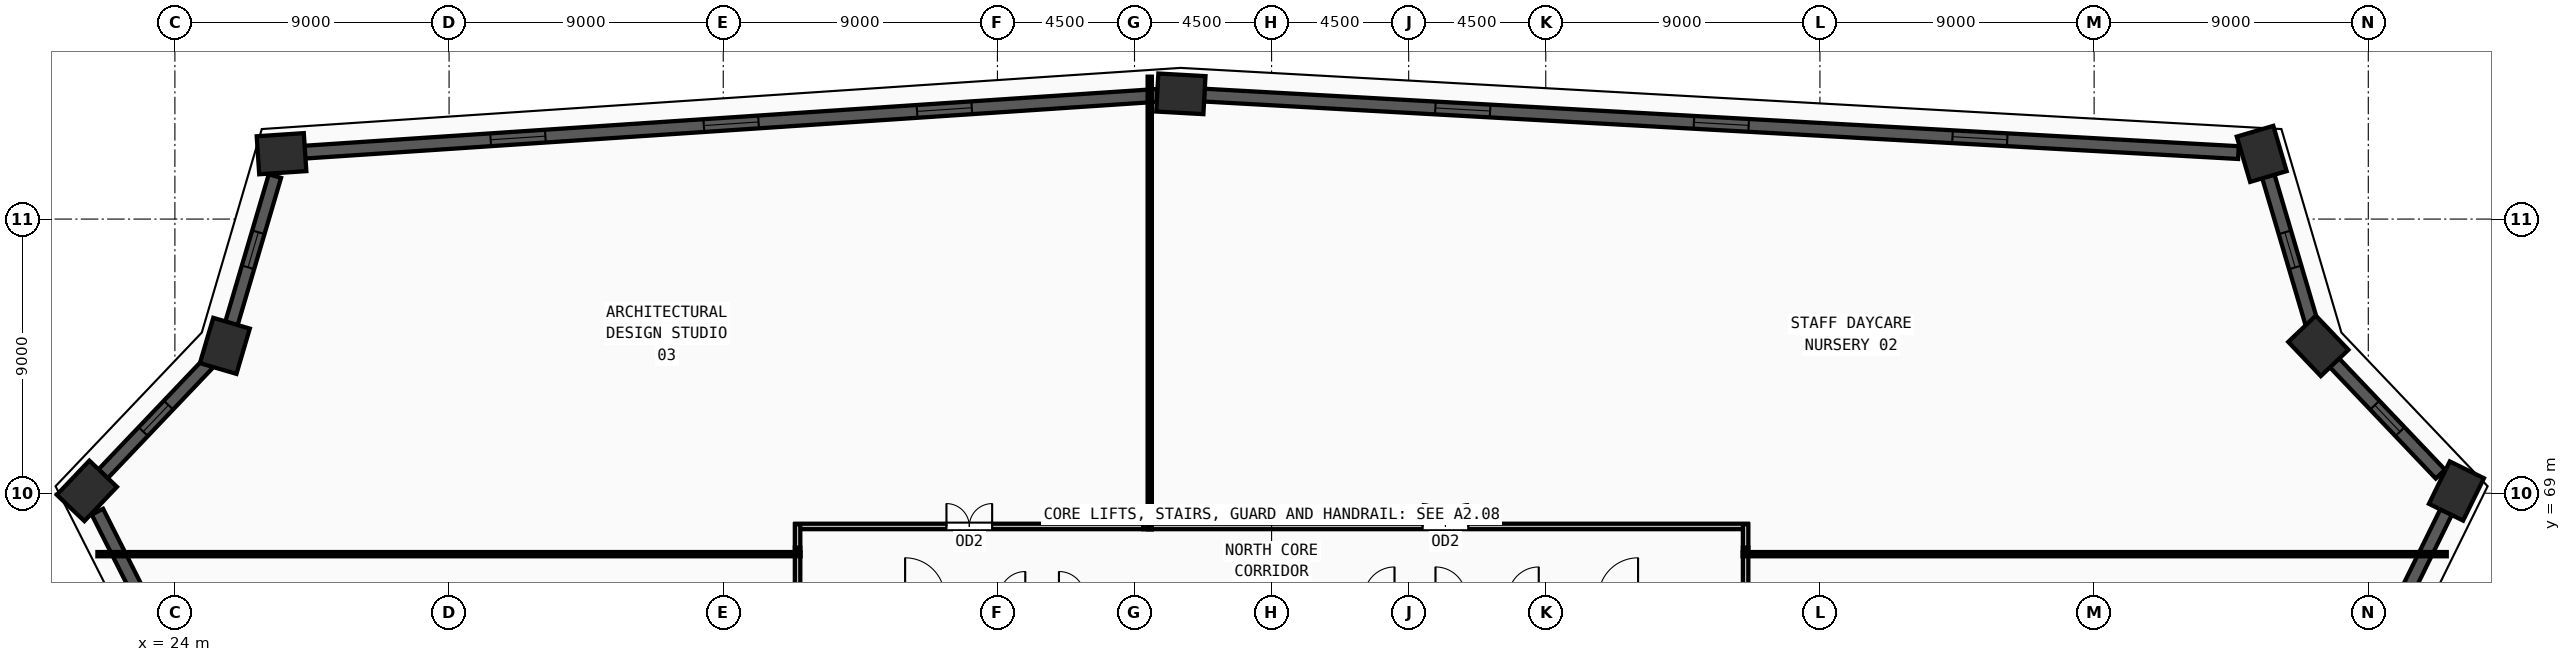
"""IFC4 building model, lengths in metres.
Left out: names, types, materials, properties, quantities, classifications, styles, units other than length and angle.
Written with IfcOpenShell. Run it as: python <this file> out.ifc"""

import sys

from ifc_helpers import new_model, si_unit, direction, frame, frame_2d, origin, origin_2d, place, context, subcontext, project, spatial, rectangle, extrude, source, transform, mapped, element, fill, save


model = new_model("IFC4")
c1 = context("Model", 3, precision=1e-05, world=origin(), true_north=direction((0.0, 1.0)))
c2 = subcontext(c1, "Body", "Model", "MODEL_VIEW")
j1 = project(units=[si_unit("LENGTHUNIT", "METRE"), si_unit("PLANEANGLEUNIT", "RADIAN")], contexts=[c1])
p1 = place(None, origin())
s1 = spatial("IfcSite", under=j1, at=p1, CompositionType="ELEMENT")
p2 = place(p1, origin())
s2 = spatial("IfcBuilding", under=s1, at=p2, CompositionType="ELEMENT")
p3 = place(p2, frame((0.0, 0.0, 39.75)))
s3 = spatial("IfcBuildingStorey", under=s2, at=p3, CompositionType="ELEMENT", Elevation=39.75)
m1 = source(origin(), c2, "Body", "SweptSolid", [
    extrude(rectangle(XDim=1.55, YDim=1.25, at=origin_2d()), origin(), (0.0, 0.0, 1.0), 3.75),
])
for number, where, z_axis, x_axis in (
    (1, (21.111, 69.078, 0.0), (0.0, 0.0, 1.0), (0.689, 0.724, 0.0)),
    (2, (25.64, 73.838, 0.0), (0.0, 0.0, 1.0), (0.283, 0.959, 0.0)),
    (3, (27.5, 80.146, 0.0), (0.0, 0.0, 1.0), (0.998, 0.066, 0.0)),
    (4, (57.022, 82.111, 0.0), (0.0, 0.0, 1.0), (-0.998, 0.055, 0.0)),
    (5, (92.502, 80.14, 0.0), (0.0, 0.0, 1.0), (-0.283, 0.959, 0.0)),
    (6, (94.36, 73.838, 0.0), (0.0, 0.0, 1.0), (-0.689, 0.724, 0.0)),
    (7, (98.894, 69.073, 0.0), (0.0, 0.0, 1.0), (0.441, 0.897, 0.0)),
):
    element("IfcColumn", number, at=place(p3, frame(where, z_axis=z_axis, x_axis=x_axis)), inside=s3, PredefinedType="COLUMN", context=c2, shape_type="MappedRepresentation", body=[
        mapped(m1, transform((0.0, 0.0, 0.0), x_axis=(1.0, 0.0, 0.0), y_axis=(0.0, 1.0, 0.0), z_axis=(0.0, 0.0, 1.0), scale=1.0)),
    ])
p4 = place(p3, frame((86.172, 43.21, 0.0), z_axis=(0.0, 0.0, 1.0), x_axis=(0.441367208162, 0.897326577985, 0.0)))
e8 = element("IfcWall", 8, at=p4, inside=s3, PredefinedType="SOLIDWALL", context=c2, shape_type="SweptSolid", body=[
    extrude(rectangle(XDim=28.058, YDim=0.42, at=frame_2d((14.029, 0.0))), origin(), (0.0, 0.0, 1.0), 3.57),
])
m2 = source(origin(), c2, "Body", "SweptSolid", [
    extrude(rectangle(XDim=1.8, YDim=1.95, at=frame_2d((0.9, 0.975))), frame((0.0, 0.22, 0.0), z_axis=(0.0, -1.0, 0.0), x_axis=(1.0, 0.0, 0.0)), (0.0, 0.0, 1.0), 0.44),
])
p5 = place(p4, frame((8.314, 0.0, 0.55)))
e9 = element("IfcOpeningElement", 9, at=p5, cuts=e8, PredefinedType="OPENING", context=c2, shape_type="MappedRepresentation", body=[
    mapped(m2, transform((0.0, 0.0, 0.0), x_axis=(1.0, 0.0, 0.0), y_axis=(0.0, 1.0, 0.0), z_axis=(0.0, 0.0, 1.0), scale=1.0)),
])
p6 = place(p4, frame((13.129, 0.0, 0.55)))
e10 = element("IfcOpeningElement", 10, at=p6, cuts=e8, PredefinedType="OPENING", context=c2, shape_type="MappedRepresentation", body=[
    mapped(m2, transform((0.0, 0.0, 0.0), x_axis=(1.0, 0.0, 0.0), y_axis=(0.0, 1.0, 0.0), z_axis=(0.0, 0.0, 1.0), scale=1.0)),
])
p7 = place(p4, frame((20.143, 0.0, 0.55)))
e11 = element("IfcOpeningElement", 11, at=p7, cuts=e8, PredefinedType="OPENING", context=c2, shape_type="MappedRepresentation", body=[
    mapped(m2, transform((0.0, 0.0, 0.0), x_axis=(1.0, 0.0, 0.0), y_axis=(0.0, 1.0, 0.0), z_axis=(0.0, 0.0, 1.0), scale=1.0)),
])
p8 = place(p3, frame((98.367, 69.627, 0.0), z_axis=(0.0, 0.0, 1.0), x_axis=(-0.689358039111, 0.724420798923, 0.0)))
e12 = element("IfcWall", 12, at=p8, inside=s3, PredefinedType="SOLIDWALL", context=c2, shape_type="SweptSolid", body=[
    extrude(rectangle(XDim=5.048, YDim=0.42, at=frame_2d((2.524, 0.0))), origin(), (0.0, 0.0, 1.0), 3.57),
])
m3 = source(origin(), c2, "Body", "SweptSolid", [
    extrude(rectangle(XDim=1.2, YDim=1.9, at=frame_2d((0.6, 0.95))), frame((0.0, 0.22, 0.0), z_axis=(0.0, -1.0, 0.0), x_axis=(1.0, 0.0, 0.0)), (0.0, 0.0, 1.0), 0.44),
])
p9 = place(p8, frame((1.924, 0.0, 0.55)))
e13 = element("IfcOpeningElement", 13, at=p9, cuts=e12, PredefinedType="OPENING", context=c2, shape_type="MappedRepresentation", body=[
    mapped(m3, transform((0.0, 0.0, 0.0), x_axis=(1.0, 0.0, 0.0), y_axis=(0.0, 1.0, 0.0), z_axis=(0.0, 0.0, 1.0), scale=1.0)),
])
p10 = place(p3, frame((94.144, 74.572, 0.0), z_axis=(0.0, 0.0, 1.0), x_axis=(-0.282945147244, 0.959136092351, 0.0)))
e14 = element("IfcWall", 14, at=p10, inside=s3, PredefinedType="SOLIDWALL", context=c2, shape_type="SweptSolid", body=[
    extrude(rectangle(XDim=5.04, YDim=0.42, at=frame_2d((2.52, 0.0))), origin(), (0.0, 0.0, 1.0), 3.57),
])
p11 = place(p10, frame((1.92, 0.0, 0.55)))
e15 = element("IfcOpeningElement", 15, at=p11, cuts=e14, PredefinedType="OPENING", context=c2, shape_type="MappedRepresentation", body=[
    mapped(m3, transform((0.0, 0.0, 0.0), x_axis=(1.0, 0.0, 0.0), y_axis=(0.0, 1.0, 0.0), z_axis=(0.0, 0.0, 1.0), scale=1.0)),
])
p12 = place(p3, frame((91.738, 80.182, 0.0), z_axis=(0.0, 0.0, 1.0), x_axis=(-0.998458762228, 0.055498649812, 0.0)))
e16 = element("IfcWall", 16, at=p12, inside=s3, PredefinedType="SOLIDWALL", context=c2, shape_type="SweptSolid", body=[
    extrude(rectangle(XDim=34.005, YDim=0.42, at=frame_2d((17.002, 0.0))), origin(), (0.0, 0.0, 1.0), 3.57),
])
p13 = place(p12, frame((7.601, 0.0, 0.55)))
e17 = element("IfcOpeningElement", 17, at=p13, cuts=e16, PredefinedType="OPENING", context=c2, shape_type="MappedRepresentation", body=[
    mapped(m2, transform((0.0, 0.0, 0.0), x_axis=(1.0, 0.0, 0.0), y_axis=(0.0, 1.0, 0.0), z_axis=(0.0, 0.0, 1.0), scale=1.0)),
])
p14 = place(p12, frame((16.102, 0.0, 0.55)))
e18 = element("IfcOpeningElement", 18, at=p14, cuts=e16, PredefinedType="OPENING", context=c2, shape_type="MappedRepresentation", body=[
    mapped(m2, transform((0.0, 0.0, 0.0), x_axis=(1.0, 0.0, 0.0), y_axis=(0.0, 1.0, 0.0), z_axis=(0.0, 0.0, 1.0), scale=1.0)),
])
p15 = place(p12, frame((24.603, 0.0, 0.55)))
e19 = element("IfcOpeningElement", 19, at=p15, cuts=e16, PredefinedType="OPENING", context=c2, shape_type="MappedRepresentation", body=[
    mapped(m2, transform((0.0, 0.0, 0.0), x_axis=(1.0, 0.0, 0.0), y_axis=(0.0, 1.0, 0.0), z_axis=(0.0, 0.0, 1.0), scale=1.0)),
])
p16 = place(p3, frame((56.259, 82.06, 0.0), z_axis=(0.0, 0.0, 1.0), x_axis=(-0.997793120451, -0.066399463707, 0.0)))
e20 = element("IfcWall", 20, at=p16, inside=s3, PredefinedType="SOLIDWALL", context=c2, shape_type="SweptSolid", body=[
    extrude(rectangle(XDim=28.058, YDim=0.42, at=frame_2d((14.029, 0.0))), origin(), (0.0, 0.0, 1.0), 3.57),
])
p17 = place(p16, frame((6.114, 0.0, 0.55)))
e21 = element("IfcOpeningElement", 21, at=p17, cuts=e20, PredefinedType="OPENING", context=c2, shape_type="MappedRepresentation", body=[
    mapped(m2, transform((0.0, 0.0, 0.0), x_axis=(1.0, 0.0, 0.0), y_axis=(0.0, 1.0, 0.0), z_axis=(0.0, 0.0, 1.0), scale=1.0)),
])
p18 = place(p16, frame((13.129, 0.0, 0.55)))
e22 = element("IfcOpeningElement", 22, at=p18, cuts=e20, PredefinedType="OPENING", context=c2, shape_type="MappedRepresentation", body=[
    mapped(m2, transform((0.0, 0.0, 0.0), x_axis=(1.0, 0.0, 0.0), y_axis=(0.0, 1.0, 0.0), z_axis=(0.0, 0.0, 1.0), scale=1.0)),
])
p19 = place(p16, frame((20.143, 0.0, 0.55)))
e23 = element("IfcOpeningElement", 23, at=p19, cuts=e20, PredefinedType="OPENING", context=c2, shape_type="MappedRepresentation", body=[
    mapped(m2, transform((0.0, 0.0, 0.0), x_axis=(1.0, 0.0, 0.0), y_axis=(0.0, 1.0, 0.0), z_axis=(0.0, 0.0, 1.0), scale=1.0)),
])
p20 = place(p3, frame((27.284, 79.412, 0.0), z_axis=(0.0, 0.0, 1.0), x_axis=(-0.282972963709, -0.959127886056, 0.0)))
e24 = element("IfcWall", 24, at=p20, inside=s3, PredefinedType="SOLIDWALL", context=c2, shape_type="SweptSolid", body=[
    extrude(rectangle(XDim=5.046, YDim=0.42, at=frame_2d((2.523, 0.0))), origin(), (0.0, 0.0, 1.0), 3.57),
])
p21 = place(p20, frame((1.923, 0.0, 0.55)))
e25 = element("IfcOpeningElement", 25, at=p21, cuts=e24, PredefinedType="OPENING", context=c2, shape_type="MappedRepresentation", body=[
    mapped(m3, transform((0.0, 0.0, 0.0), x_axis=(1.0, 0.0, 0.0), y_axis=(0.0, 1.0, 0.0), z_axis=(0.0, 0.0, 1.0), scale=1.0)),
])
p22 = place(p3, frame((25.113, 73.284, 0.0), z_axis=(0.0, 0.0, 1.0), x_axis=(-0.689357621712, -0.72442119612, 0.0)))
e26 = element("IfcWall", 26, at=p22, inside=s3, PredefinedType="SOLIDWALL", context=c2, shape_type="SweptSolid", body=[
    extrude(rectangle(XDim=5.041, YDim=0.42, at=frame_2d((2.521, 0.0))), origin(), (0.0, 0.0, 1.0), 3.57),
])
p23 = place(p22, frame((1.921, 0.0, 0.55)))
e27 = element("IfcOpeningElement", 27, at=p23, cuts=e26, PredefinedType="OPENING", context=c2, shape_type="MappedRepresentation", body=[
    mapped(m3, transform((0.0, 0.0, 0.0), x_axis=(1.0, 0.0, 0.0), y_axis=(0.0, 1.0, 0.0), z_axis=(0.0, 0.0, 1.0), scale=1.0)),
])
p24 = place(p3, frame((21.456, 68.395, 0.0), z_axis=(0.0, 0.0, 1.0), x_axis=(0.451198099626, -0.892423820219, 0.0)))
e28 = element("IfcWall", 28, at=p24, inside=s3, PredefinedType="SOLIDWALL", context=c2, shape_type="SweptSolid", body=[
    extrude(rectangle(XDim=34.005, YDim=0.42, at=frame_2d((17.002, 0.0))), origin(), (0.0, 0.0, 1.0), 3.57),
])
p25 = place(p24, frame((7.601, 0.0, 0.55)))
e29 = element("IfcOpeningElement", 29, at=p25, cuts=e28, PredefinedType="OPENING", context=c2, shape_type="MappedRepresentation", body=[
    mapped(m2, transform((0.0, 0.0, 0.0), x_axis=(1.0, 0.0, 0.0), y_axis=(0.0, 1.0, 0.0), z_axis=(0.0, 0.0, 1.0), scale=1.0)),
])
p26 = place(p24, frame((16.103, 0.0, 0.55)))
e30 = element("IfcOpeningElement", 30, at=p26, cuts=e28, PredefinedType="OPENING", context=c2, shape_type="MappedRepresentation", body=[
    mapped(m2, transform((0.0, 0.0, 0.0), x_axis=(1.0, 0.0, 0.0), y_axis=(0.0, 1.0, 0.0), z_axis=(0.0, 0.0, 1.0), scale=1.0)),
])
p27 = place(p3, frame((55.785, 67.91, 0.0), z_axis=(0.0, 0.0, 1.0), x_axis=(1.0, 0.0, 0.0)))
e31 = element("IfcWall", 31, at=p27, inside=s3, PredefinedType="PARTITIONING", context=c2, shape_type="SweptSolid", body=[
    extrude(rectangle(XDim=19.845, YDim=0.18, at=frame_2d((9.922, 0.0))), origin(), (0.0, 0.0, 1.0), 3.57),
])
m4 = source(origin(), c2, "Body", "SweptSolid", [
    extrude(rectangle(XDim=1.5, YDim=2.2, at=frame_2d((0.75, 1.1))), frame((0.0, 0.1, 0.0), z_axis=(0.0, -1.0, 0.0), x_axis=(1.0, 0.0, 0.0)), (0.0, 0.0, 1.0), 0.2),
])
p28 = place(p27, frame((9.172, 0.0, 0.0)))
e32 = element("IfcOpeningElement", 32, at=p28, cuts=e31, PredefinedType="OPENING", context=c2, shape_type="MappedRepresentation", body=[
    mapped(m4, transform((0.0, 0.0, 0.0), x_axis=(1.0, 0.0, 0.0), y_axis=(0.0, 1.0, 0.0), z_axis=(0.0, 0.0, 1.0), scale=1.0)),
])
p29 = place(p3, frame((44.37, 67.91, 0.0), z_axis=(0.0, 0.0, 1.0), x_axis=(1.0, 0.0, 0.0)))
e33 = element("IfcWall", 33, at=p29, inside=s3, PredefinedType="PARTITIONING", context=c2, shape_type="SweptSolid", body=[
    extrude(rectangle(XDim=11.415, YDim=0.18, at=frame_2d((5.708, 0.0))), origin(), (0.0, 0.0, 1.0), 3.57),
])
p30 = place(p29, frame((4.957, 0.0, 0.0)))
e34 = element("IfcOpeningElement", 34, at=p30, cuts=e33, PredefinedType="OPENING", context=c2, shape_type="MappedRepresentation", body=[
    mapped(m4, transform((0.0, 0.0, 0.0), x_axis=(1.0, 0.0, 0.0), y_axis=(0.0, 1.0, 0.0), z_axis=(0.0, 0.0, 1.0), scale=1.0)),
])
p31 = place(p3, frame((44.44, 54.785, 0.0), z_axis=(0.0, 0.0, 1.0), x_axis=(0.0, 1.0, 0.0)))
e35 = element("IfcWall", 35, at=p31, inside=s3, PredefinedType="PARTITIONING", context=c2, shape_type="SweptSolid", body=[
    extrude(rectangle(XDim=12.43, YDim=0.18, at=frame_2d((6.215, 0.0))), origin(), (0.0, 0.0, 1.0), 3.57),
])
p32 = place(p31, frame((5.465, 0.0, 0.0)))
e36 = element("IfcOpeningElement", 36, at=p32, cuts=e35, PredefinedType="OPENING", context=c2, shape_type="MappedRepresentation", body=[
    mapped(m4, transform((0.0, 0.0, 0.0), x_axis=(1.0, 0.0, 0.0), y_axis=(0.0, 1.0, 0.0), z_axis=(0.0, 0.0, 1.0), scale=1.0)),
])
p33 = place(p3, frame((75.56, 67.215, 0.0), z_axis=(0.0, 0.0, 1.0), x_axis=(0.0, -1.0, 0.0)))
e37 = element("IfcWall", 37, at=p33, inside=s3, PredefinedType="PARTITIONING", context=c2, shape_type="SweptSolid", body=[
    extrude(rectangle(XDim=2.235, YDim=0.18, at=frame_2d((1.118, 0.0))), origin(), (0.0, 0.0, 1.0), 3.57),
])
for number, where, z_axis, x_axis in (
    (38, (75.56, 67.98, 0.0), (0.0, 0.0, 1.0), (0.0, -1.0, 0.0)),
    (39, (44.44, 67.215, 0.0), (0.0, 0.0, 1.0), (0.0, 1.0, 0.0)),
):
    element("IfcWall", number, at=place(p3, frame(where, z_axis=z_axis, x_axis=x_axis)), inside=s3, PredefinedType="PARTITIONING", context=c2, shape_type="SweptSolid", body=[
        extrude(rectangle(XDim=0.765, YDim=0.18, at=frame_2d((0.382, 0.0))), origin(), (0.0, 0.0, 1.0), 3.57),
    ])
p34 = place(p3, frame((44.54, 67.0, 0.0), z_axis=(0.0, 0.0, 1.0), x_axis=(-1.0, 0.0, 0.0)))
e40 = element("IfcWall", 40, at=p34, inside=s3, PredefinedType="PARTITIONING", context=c2, shape_type="SweptSolid", body=[
    extrude(rectangle(XDim=23.084, YDim=0.14, at=frame_2d((11.542, 0.0))), origin(), (0.0, 0.0, 1.0), 2.655),
])
p35 = place(p3, frame((75.46, 67.0, 0.0), z_axis=(0.0, 0.0, 1.0), x_axis=(1.0, 0.0, 0.0)))
e41 = element("IfcWall", 41, at=p35, inside=s3, PredefinedType="PARTITIONING", context=c2, shape_type="SweptSolid", body=[
    extrude(rectangle(XDim=23.116, YDim=0.14, at=frame_2d((11.558, 0.0))), origin(), (0.0, 0.0, 1.0), 2.655),
])
p36 = place(p3, frame((56.0, 67.81, 0.0), z_axis=(0.0, 0.0, 1.0), x_axis=(0.0, 1.0, 0.0)))
e42 = element("IfcWall", 42, at=p36, inside=s3, PredefinedType="PARTITIONING", context=c2, shape_type="SweptSolid", body=[
    extrude(rectangle(XDim=14.865, YDim=0.14, at=frame_2d((7.433, 0.0))), origin(), (0.0, 0.0, 1.0), 3.57),
])
m5 = source(origin(), c2, "Body", "SweptSolid", [
    extrude(rectangle(XDim=1.2, YDim=1.9, at=frame_2d((0.6, 0.95))), frame((0.0, 0.03, 0.0), z_axis=(0.0, -1.0, 0.0), x_axis=(1.0, 0.0, 0.0)), (0.0, 0.0, 1.0), 0.06),
])
p37 = place(p9, origin())
e43 = element("IfcWindow", 43, at=p37, inside=s3, PartitioningType="SINGLE_PANEL", PredefinedType="WINDOW", context=c2, shape_type="MappedRepresentation", body=[
    mapped(m5, transform((0.0, 0.0, 0.0), x_axis=(1.0, 0.0, 0.0), y_axis=(0.0, 1.0, 0.0), z_axis=(0.0, 0.0, 1.0), scale=1.0)),
])
fill(e13, e43)
p38 = place(p11, origin())
e44 = element("IfcWindow", 44, at=p38, inside=s3, PartitioningType="SINGLE_PANEL", PredefinedType="WINDOW", context=c2, shape_type="MappedRepresentation", body=[
    mapped(m5, transform((0.0, 0.0, 0.0), x_axis=(1.0, 0.0, 0.0), y_axis=(0.0, 1.0, 0.0), z_axis=(0.0, 0.0, 1.0), scale=1.0)),
])
fill(e15, e44)
m6 = source(origin(), c2, "Body", "SweptSolid", [
    extrude(rectangle(XDim=1.8, YDim=1.95, at=frame_2d((0.9, 0.975))), frame((0.0, 0.03, 0.0), z_axis=(0.0, -1.0, 0.0), x_axis=(1.0, 0.0, 0.0)), (0.0, 0.0, 1.0), 0.06),
])
p39 = place(p13, origin())
e45 = element("IfcWindow", 45, at=p39, inside=s3, PartitioningType="DOUBLE_PANEL_VERTICAL", PredefinedType="WINDOW", context=c2, shape_type="MappedRepresentation", body=[
    mapped(m6, transform((0.0, 0.0, 0.0), x_axis=(1.0, 0.0, 0.0), y_axis=(0.0, 1.0, 0.0), z_axis=(0.0, 0.0, 1.0), scale=1.0)),
])
fill(e17, e45)
p40 = place(p14, origin())
e46 = element("IfcWindow", 46, at=p40, inside=s3, PartitioningType="DOUBLE_PANEL_VERTICAL", PredefinedType="WINDOW", context=c2, shape_type="MappedRepresentation", body=[
    mapped(m6, transform((0.0, 0.0, 0.0), x_axis=(1.0, 0.0, 0.0), y_axis=(0.0, 1.0, 0.0), z_axis=(0.0, 0.0, 1.0), scale=1.0)),
])
fill(e18, e46)
p41 = place(p15, origin())
e47 = element("IfcWindow", 47, at=p41, inside=s3, PartitioningType="DOUBLE_PANEL_VERTICAL", PredefinedType="WINDOW", context=c2, shape_type="MappedRepresentation", body=[
    mapped(m6, transform((0.0, 0.0, 0.0), x_axis=(1.0, 0.0, 0.0), y_axis=(0.0, 1.0, 0.0), z_axis=(0.0, 0.0, 1.0), scale=1.0)),
])
fill(e19, e47)
p42 = place(p17, origin())
e48 = element("IfcWindow", 48, at=p42, inside=s3, PartitioningType="DOUBLE_PANEL_VERTICAL", PredefinedType="WINDOW", context=c2, shape_type="MappedRepresentation", body=[
    mapped(m6, transform((0.0, 0.0, 0.0), x_axis=(1.0, 0.0, 0.0), y_axis=(0.0, 1.0, 0.0), z_axis=(0.0, 0.0, 1.0), scale=1.0)),
])
fill(e21, e48)
p43 = place(p18, origin())
e49 = element("IfcWindow", 49, at=p43, inside=s3, PartitioningType="DOUBLE_PANEL_VERTICAL", PredefinedType="WINDOW", context=c2, shape_type="MappedRepresentation", body=[
    mapped(m6, transform((0.0, 0.0, 0.0), x_axis=(1.0, 0.0, 0.0), y_axis=(0.0, 1.0, 0.0), z_axis=(0.0, 0.0, 1.0), scale=1.0)),
])
fill(e22, e49)
p44 = place(p19, origin())
e50 = element("IfcWindow", 50, at=p44, inside=s3, PartitioningType="DOUBLE_PANEL_VERTICAL", PredefinedType="WINDOW", context=c2, shape_type="MappedRepresentation", body=[
    mapped(m6, transform((0.0, 0.0, 0.0), x_axis=(1.0, 0.0, 0.0), y_axis=(0.0, 1.0, 0.0), z_axis=(0.0, 0.0, 1.0), scale=1.0)),
])
fill(e23, e50)
p45 = place(p21, origin())
e51 = element("IfcWindow", 51, at=p45, inside=s3, PartitioningType="SINGLE_PANEL", PredefinedType="WINDOW", context=c2, shape_type="MappedRepresentation", body=[
    mapped(m5, transform((0.0, 0.0, 0.0), x_axis=(1.0, 0.0, 0.0), y_axis=(0.0, 1.0, 0.0), z_axis=(0.0, 0.0, 1.0), scale=1.0)),
])
fill(e25, e51)
p46 = place(p23, origin())
e52 = element("IfcWindow", 52, at=p46, inside=s3, PartitioningType="SINGLE_PANEL", PredefinedType="WINDOW", context=c2, shape_type="MappedRepresentation", body=[
    mapped(m5, transform((0.0, 0.0, 0.0), x_axis=(1.0, 0.0, 0.0), y_axis=(0.0, 1.0, 0.0), z_axis=(0.0, 0.0, 1.0), scale=1.0)),
])
fill(e27, e52)
m7 = source(origin(), c2, "Body", "SweptSolid", [
    extrude(rectangle(XDim=1.5, YDim=2.2, at=frame_2d((0.75, 1.1))), frame((0.0, 0.025, 0.0), z_axis=(0.0, -1.0, 0.0), x_axis=(1.0, 0.0, 0.0)), (0.0, 0.0, 1.0), 0.05),
])
p47 = place(p28, origin())
e53 = element("IfcDoor", 53, at=p47, inside=s3, OperationType="DOUBLE_DOOR_SINGLE_SWING", PredefinedType="DOOR", context=c2, shape_type="MappedRepresentation", body=[
    mapped(m7, transform((0.0, 0.0, 0.0), x_axis=(1.0, 0.0, 0.0), y_axis=(0.0, 1.0, 0.0), z_axis=(0.0, 0.0, 1.0), scale=1.0)),
])
fill(e32, e53)
p48 = place(p30, origin())
e54 = element("IfcDoor", 54, at=p48, inside=s3, OperationType="DOUBLE_DOOR_SINGLE_SWING", PredefinedType="DOOR", context=c2, shape_type="MappedRepresentation", body=[
    mapped(m7, transform((0.0, 0.0, 0.0), x_axis=(1.0, 0.0, 0.0), y_axis=(0.0, 1.0, 0.0), z_axis=(0.0, 0.0, 1.0), scale=1.0)),
])
fill(e34, e54)
save(model, sys.argv[1])
